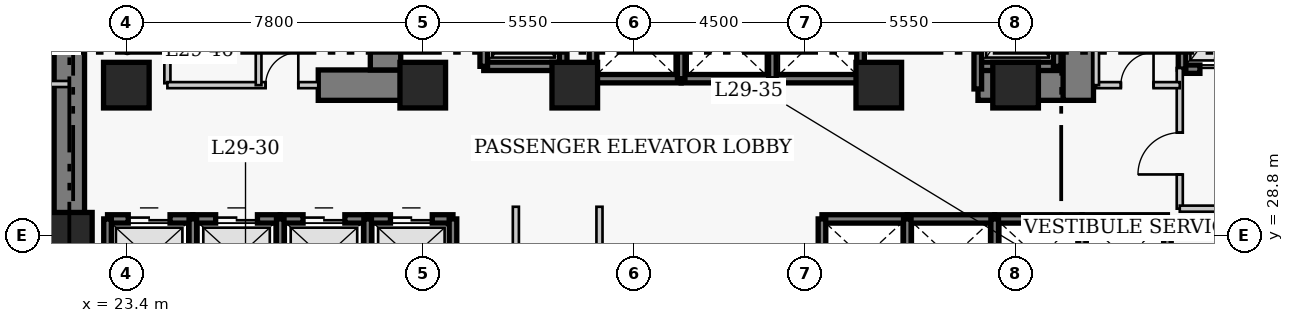
"""IFC4 building model, lengths in metres.
Left out: names, types, materials, properties, quantities, classifications, styles, units other than length and angle.
Written with IfcOpenShell. Run it as: python <this file> out.ifc"""

import sys

from ifc_helpers import new_model, si_unit, direction, frame, frame_2d, origin, origin_2d, place, context, subcontext, project, spatial, rectangle, extrude, element, fill, save


model = new_model("IFC4")
c1 = context("Model", 3, precision=1e-05, world=origin(), true_north=direction((0.0, 1.0)))
c2 = subcontext(c1, "Body", "Model", "MODEL_VIEW")
j1 = project(units=[si_unit("LENGTHUNIT", "METRE"), si_unit("PLANEANGLEUNIT", "RADIAN")], contexts=[c1])
p1 = place(None, origin())
s1 = spatial("IfcSite", under=j1, at=p1, CompositionType="ELEMENT")
p2 = place(p1, origin())
s2 = spatial("IfcBuilding", under=s1, at=p2, CompositionType="ELEMENT")
p3 = place(p2, frame((0.0, 0.0, 118.4)))
s3 = spatial("IfcBuildingStorey", under=s2, at=p3, CompositionType="ELEMENT", Elevation=118.4)
p4 = place(p3, frame((21.9, 27.05, 0.0), z_axis=(0.0, 0.0, 1.0), x_axis=(0.0, 1.0, 0.0)))
e1 = element("IfcWall", 1, at=p4, inside=s3, PredefinedType="SHEAR", context=c2, shape_type="SweptSolid", body=[
    extrude(rectangle(XDim=13.67, YDim=0.8, at=frame_2d((6.835, 0.0))), origin(), (0.0, 0.0, 1.0), 3.8),
])
p5 = place(p3, frame((28.45, 32.75, 0.0), z_axis=(0.0, 0.0, 1.0), x_axis=(1.0, 0.0, 0.0)))
e2 = element("IfcWall", 2, at=p5, inside=s3, PredefinedType="SHEAR", context=c2, shape_type="SweptSolid", body=[
    extrude(rectangle(XDim=2.4, YDim=0.8, at=frame_2d((1.2, 0.0))), origin(), (0.0, 0.0, 1.0), 3.8),
])
p6 = place(p3, frame((45.81, 32.75, 0.0), z_axis=(0.0, 0.0, 1.0), x_axis=(1.0, 0.0, 0.0)))
e3 = element("IfcWall", 3, at=p6, inside=s3, PredefinedType="SHEAR", context=c2, shape_type="SweptSolid", body=[
    extrude(rectangle(XDim=2.64, YDim=0.8, at=frame_2d((1.32, 0.0))), origin(), (0.0, 0.0, 1.0), 3.8),
])
p7 = place(p3, frame((30.22, 33.15, 0.0), z_axis=(0.0, 0.0, 1.0), x_axis=(0.0, 1.0, 0.0)))
e4 = element("IfcWall", 4, at=p7, inside=s3, PredefinedType="SHEAR", context=c2, shape_type="SweptSolid", body=[
    extrude(rectangle(XDim=7.17, YDim=0.8, at=frame_2d((3.585, 0.0))), origin(), (0.0, 0.0, 1.0), 3.8),
])
p8 = place(p3, frame((48.45, 32.35, 0.0), z_axis=(0.0, 0.0, 1.0), x_axis=(0.0, 1.0, 0.0)))
e5 = element("IfcWall", 5, at=p8, inside=s3, PredefinedType="SHEAR", context=c2, shape_type="SweptSolid", body=[
    extrude(rectangle(XDim=7.97, YDim=0.8, at=frame_2d((3.985, 0.0))), origin(), (0.0, 0.0, 1.0), 3.8),
])
p9 = place(p8, frame((5.85, 0.0, 0.0)))
e6 = element("IfcOpeningElement", 6, at=p9, cuts=e5, PredefinedType="OPENING", context=c2, shape_type="SweptSolid", body=[
    extrude(rectangle(XDim=1.1, YDim=2.15, at=frame_2d((0.55, 1.075))), frame((0.0, 0.41, 0.0), z_axis=(0.0, -1.0, 0.0), x_axis=(1.0, 0.0, 0.0)), (0.0, 0.0, 1.0), 0.82),
])
for number, where, z_axis, x_axis in (
    (7, (21.9, 28.8, 0.0), (0.0, 0.0, 1.0), (1.0, 0.0, 0.0)),
    (8, (23.4, 32.75, 0.0), (0.0, 0.0, 1.0), (1.0, 0.0, 0.0)),
    (9, (31.2, 32.75, 0.0), (0.0, 0.0, 1.0), (1.0, 0.0, 0.0)),
    (10, (35.2, 32.75, 0.0), (0.0, 0.0, 1.0), (1.0, 0.0, 0.0)),
    (11, (43.2, 32.75, 0.0), (0.0, 0.0, 1.0), (1.0, 0.0, 0.0)),
    (12, (46.8, 32.75, 0.0), (0.0, 0.0, 1.0), (1.0, 0.0, 0.0)),
):
    element("IfcColumn", number, at=place(p3, frame(where, z_axis=z_axis, x_axis=x_axis)), inside=s3, PredefinedType="COLUMN", context=c2, shape_type="SweptSolid", body=[
        extrude(rectangle(XDim=1.2, YDim=1.2, at=origin_2d()), origin(), (0.0, 0.0, 1.0), 3.8),
    ])
p10 = place(p3, frame((22.905, 29.23, 0.0), z_axis=(0.0, 0.0, 1.0), x_axis=(1.0, 0.0, 0.0)))
e13 = element("IfcWall", 13, at=p10, inside=s3, PredefinedType="SHEAR", context=c2, shape_type="SweptSolid", body=[
    extrude(rectangle(XDim=2.245, YDim=0.22, at=frame_2d((1.123, 0.0))), origin(), (0.0, 0.0, 1.0), 3.8),
])
p11 = place(p10, frame((0.545, 0.0, 0.0)))
e14 = element("IfcOpeningElement", 14, at=p11, cuts=e13, PredefinedType="OPENING", context=c2, shape_type="SweptSolid", body=[
    extrude(rectangle(XDim=1.1, YDim=2.15, at=frame_2d((0.55, 1.075))), frame((0.0, 0.12, 0.0), z_axis=(0.0, -1.0, 0.0), x_axis=(1.0, 0.0, 0.0)), (0.0, 0.0, 1.0), 0.24),
])
p12 = place(p3, frame((22.905, 27.17, 0.0), z_axis=(0.0, 0.0, 1.0), x_axis=(0.0, 1.0, 0.0)))
e15 = element("IfcWall", 15, at=p12, inside=s3, PredefinedType="SHEAR", context=c2, shape_type="SweptSolid", body=[
    extrude(rectangle(XDim=2.06, YDim=0.2, at=frame_2d((1.03, 0.0))), origin(), (0.0, 0.0, 1.0), 3.8),
])
p13 = place(p3, frame((25.15, 29.23, 0.0), z_axis=(0.0, 0.0, 1.0), x_axis=(1.0, 0.0, 0.0)))
e16 = element("IfcWall", 16, at=p13, inside=s3, PredefinedType="SHEAR", context=c2, shape_type="SweptSolid", body=[
    extrude(rectangle(XDim=2.3, YDim=0.22, at=frame_2d((1.15, 0.0))), origin(), (0.0, 0.0, 1.0), 3.8),
])
p14 = place(p13, frame((0.6, 0.0, 0.0)))
e17 = element("IfcOpeningElement", 17, at=p14, cuts=e16, PredefinedType="OPENING", context=c2, shape_type="SweptSolid", body=[
    extrude(rectangle(XDim=1.1, YDim=2.15, at=frame_2d((0.55, 1.075))), frame((0.0, 0.12, 0.0), z_axis=(0.0, -1.0, 0.0), x_axis=(1.0, 0.0, 0.0)), (0.0, 0.0, 1.0), 0.24),
])
p15 = place(p3, frame((25.15, 27.17, 0.0), z_axis=(0.0, 0.0, 1.0), x_axis=(0.0, 1.0, 0.0)))
e18 = element("IfcWall", 18, at=p15, inside=s3, PredefinedType="SHEAR", context=c2, shape_type="SweptSolid", body=[
    extrude(rectangle(XDim=2.06, YDim=0.2, at=frame_2d((1.03, 0.0))), origin(), (0.0, 0.0, 1.0), 3.8),
])
p16 = place(p3, frame((27.45, 29.23, 0.0), z_axis=(0.0, 0.0, 1.0), x_axis=(1.0, 0.0, 0.0)))
e19 = element("IfcWall", 19, at=p16, inside=s3, PredefinedType="SHEAR", context=c2, shape_type="SweptSolid", body=[
    extrude(rectangle(XDim=2.3, YDim=0.22, at=frame_2d((1.15, 0.0))), origin(), (0.0, 0.0, 1.0), 3.8),
])
p17 = place(p16, frame((0.6, 0.0, 0.0)))
e20 = element("IfcOpeningElement", 20, at=p17, cuts=e19, PredefinedType="OPENING", context=c2, shape_type="SweptSolid", body=[
    extrude(rectangle(XDim=1.1, YDim=2.15, at=frame_2d((0.55, 1.075))), frame((0.0, 0.12, 0.0), z_axis=(0.0, -1.0, 0.0), x_axis=(1.0, 0.0, 0.0)), (0.0, 0.0, 1.0), 0.24),
])
p18 = place(p3, frame((27.45, 27.17, 0.0), z_axis=(0.0, 0.0, 1.0), x_axis=(0.0, 1.0, 0.0)))
e21 = element("IfcWall", 21, at=p18, inside=s3, PredefinedType="SHEAR", context=c2, shape_type="SweptSolid", body=[
    extrude(rectangle(XDim=2.06, YDim=0.2, at=frame_2d((1.03, 0.0))), origin(), (0.0, 0.0, 1.0), 3.8),
])
p19 = place(p3, frame((29.75, 29.23, 0.0), z_axis=(0.0, 0.0, 1.0), x_axis=(1.0, 0.0, 0.0)))
e22 = element("IfcWall", 22, at=p19, inside=s3, PredefinedType="SHEAR", context=c2, shape_type="SweptSolid", body=[
    extrude(rectangle(XDim=2.245, YDim=0.22, at=frame_2d((1.123, 0.0))), origin(), (0.0, 0.0, 1.0), 3.8),
])
p20 = place(p19, frame((0.6, 0.0, 0.0)))
e23 = element("IfcOpeningElement", 23, at=p20, cuts=e22, PredefinedType="OPENING", context=c2, shape_type="SweptSolid", body=[
    extrude(rectangle(XDim=1.1, YDim=2.15, at=frame_2d((0.55, 1.075))), frame((0.0, 0.12, 0.0), z_axis=(0.0, -1.0, 0.0), x_axis=(1.0, 0.0, 0.0)), (0.0, 0.0, 1.0), 0.24),
])
for number, where, z_axis, x_axis in (
    (24, (29.75, 27.17, 0.0), (0.0, 0.0, 1.0), (0.0, 1.0, 0.0)),
    (25, (31.995, 27.17, 0.0), (0.0, 0.0, 1.0), (0.0, 1.0, 0.0)),
):
    element("IfcWall", number, at=place(p3, frame(where, z_axis=z_axis, x_axis=x_axis)), inside=s3, PredefinedType="SHEAR", context=c2, shape_type="SweptSolid", body=[
        extrude(rectangle(XDim=2.06, YDim=0.2, at=frame_2d((1.03, 0.0))), origin(), (0.0, 0.0, 1.0), 3.8),
    ])
p21 = place(p3, frame((41.705, 29.23, 0.0), z_axis=(0.0, 0.0, 1.0), x_axis=(1.0, 0.0, 0.0)))
e26 = element("IfcWall", 26, at=p21, inside=s3, PredefinedType="SHEAR", context=c2, shape_type="SweptSolid", body=[
    extrude(rectangle(XDim=2.245, YDim=0.22, at=frame_2d((1.123, 0.0))), origin(), (0.0, 0.0, 1.0), 3.8),
])
p22 = place(p3, frame((41.705, 27.17, 0.0), z_axis=(0.0, 0.0, 1.0), x_axis=(0.0, 1.0, 0.0)))
e27 = element("IfcWall", 27, at=p22, inside=s3, PredefinedType="SHEAR", context=c2, shape_type="SweptSolid", body=[
    extrude(rectangle(XDim=2.06, YDim=0.2, at=frame_2d((1.03, 0.0))), origin(), (0.0, 0.0, 1.0), 3.8),
])
p23 = place(p3, frame((43.95, 29.23, 0.0), z_axis=(0.0, 0.0, 1.0), x_axis=(1.0, 0.0, 0.0)))
e28 = element("IfcWall", 28, at=p23, inside=s3, PredefinedType="SHEAR", context=c2, shape_type="SweptSolid", body=[
    extrude(rectangle(XDim=2.3, YDim=0.22, at=frame_2d((1.15, 0.0))), origin(), (0.0, 0.0, 1.0), 3.8),
])
p24 = place(p3, frame((43.95, 27.17, 0.0), z_axis=(0.0, 0.0, 1.0), x_axis=(0.0, 1.0, 0.0)))
e29 = element("IfcWall", 29, at=p24, inside=s3, PredefinedType="SHEAR", context=c2, shape_type="SweptSolid", body=[
    extrude(rectangle(XDim=2.06, YDim=0.2, at=frame_2d((1.03, 0.0))), origin(), (0.0, 0.0, 1.0), 3.8),
])
p25 = place(p3, frame((46.25, 29.23, 0.0), z_axis=(0.0, 0.0, 1.0), x_axis=(1.0, 0.0, 0.0)))
e30 = element("IfcWall", 30, at=p25, inside=s3, PredefinedType="SHEAR", context=c2, shape_type="SweptSolid", body=[
    extrude(rectangle(XDim=2.3, YDim=0.22, at=frame_2d((1.15, 0.0))), origin(), (0.0, 0.0, 1.0), 3.8),
])
p26 = place(p3, frame((46.25, 27.17, 0.0), z_axis=(0.0, 0.0, 1.0), x_axis=(0.0, 1.0, 0.0)))
e31 = element("IfcWall", 31, at=p26, inside=s3, PredefinedType="SHEAR", context=c2, shape_type="SweptSolid", body=[
    extrude(rectangle(XDim=2.06, YDim=0.2, at=frame_2d((1.03, 0.0))), origin(), (0.0, 0.0, 1.0), 3.8),
])
p27 = place(p3, frame((48.55, 29.23, 0.0), z_axis=(0.0, 0.0, 1.0), x_axis=(1.0, 0.0, 0.0)))
e32 = element("IfcWall", 32, at=p27, inside=s3, PredefinedType="SHEAR", context=c2, shape_type="SweptSolid", body=[
    extrude(rectangle(XDim=2.245, YDim=0.22, at=frame_2d((1.123, 0.0))), origin(), (0.0, 0.0, 1.0), 3.8),
])
for number, where, z_axis, x_axis in (
    (33, (48.55, 27.17, 0.0), (0.0, 0.0, 1.0), (0.0, 1.0, 0.0)),
    (34, (50.795, 27.17, 0.0), (0.0, 0.0, 1.0), (0.0, 1.0, 0.0)),
):
    element("IfcWall", number, at=place(p3, frame(where, z_axis=z_axis, x_axis=x_axis)), inside=s3, PredefinedType="SHEAR", context=c2, shape_type="SweptSolid", body=[
        extrude(rectangle(XDim=2.06, YDim=0.2, at=frame_2d((1.03, 0.0))), origin(), (0.0, 0.0, 1.0), 3.8),
    ])
p28 = place(p3, frame((35.68, 32.92, 0.0), z_axis=(0.0, 0.0, 1.0), x_axis=(1.0, 0.0, 0.0)))
e35 = element("IfcWall", 35, at=p28, inside=s3, PredefinedType="SHEAR", context=c2, shape_type="SweptSolid", body=[
    extrude(rectangle(XDim=2.32, YDim=0.22, at=frame_2d((1.16, 0.0))), origin(), (0.0, 0.0, 1.0), 3.8),
])
p29 = place(p3, frame((35.68, 32.92, 0.0), z_axis=(0.0, 0.0, 1.0), x_axis=(0.0, 1.0, 0.0)))
e36 = element("IfcWall", 36, at=p29, inside=s3, PredefinedType="SHEAR", context=c2, shape_type="SweptSolid", body=[
    extrude(rectangle(XDim=2.16, YDim=0.2, at=frame_2d((1.08, 0.0))), origin(), (0.0, 0.0, 1.0), 3.8),
])
p30 = place(p3, frame((38.0, 32.92, 0.0), z_axis=(0.0, 0.0, 1.0), x_axis=(1.0, 0.0, 0.0)))
e37 = element("IfcWall", 37, at=p30, inside=s3, PredefinedType="SHEAR", context=c2, shape_type="SweptSolid", body=[
    extrude(rectangle(XDim=2.4, YDim=0.22, at=frame_2d((1.2, 0.0))), origin(), (0.0, 0.0, 1.0), 3.8),
])
p31 = place(p3, frame((38.0, 32.92, 0.0), z_axis=(0.0, 0.0, 1.0), x_axis=(0.0, 1.0, 0.0)))
e38 = element("IfcWall", 38, at=p31, inside=s3, PredefinedType="SHEAR", context=c2, shape_type="SweptSolid", body=[
    extrude(rectangle(XDim=2.16, YDim=0.2, at=frame_2d((1.08, 0.0))), origin(), (0.0, 0.0, 1.0), 3.8),
])
p32 = place(p3, frame((40.4, 32.92, 0.0), z_axis=(0.0, 0.0, 1.0), x_axis=(1.0, 0.0, 0.0)))
e39 = element("IfcWall", 39, at=p32, inside=s3, PredefinedType="SHEAR", context=c2, shape_type="SweptSolid", body=[
    extrude(rectangle(XDim=2.32, YDim=0.22, at=frame_2d((1.16, 0.0))), origin(), (0.0, 0.0, 1.0), 3.8),
])
for number, where, z_axis, x_axis in (
    (40, (40.4, 32.92, 0.0), (0.0, 0.0, 1.0), (0.0, 1.0, 0.0)),
    (41, (42.72, 32.92, 0.0), (0.0, 0.0, 1.0), (0.0, 1.0, 0.0)),
):
    element("IfcWall", number, at=place(p3, frame(where, z_axis=z_axis, x_axis=x_axis)), inside=s3, PredefinedType="SHEAR", context=c2, shape_type="SweptSolid", body=[
        extrude(rectangle(XDim=2.16, YDim=0.2, at=frame_2d((1.08, 0.0))), origin(), (0.0, 0.0, 1.0), 3.8),
    ])
p33 = place(p3, frame((51.18, 33.17, 0.0), z_axis=(0.0, 0.0, 1.0), x_axis=(1.0, 0.0, 0.0)))
e42 = element("IfcWall", 42, at=p33, inside=s3, PredefinedType="SHEAR", context=c2, shape_type="SweptSolid", body=[
    extrude(rectangle(XDim=2.42, YDim=0.22, at=frame_2d((1.21, 0.0))), origin(), (0.0, 0.0, 1.0), 3.8),
])
p34 = place(p33, frame((0.47, 0.0, 0.0)))
e43 = element("IfcOpeningElement", 43, at=p34, cuts=e42, PredefinedType="OPENING", context=c2, shape_type="SweptSolid", body=[
    extrude(rectangle(XDim=1.3, YDim=2.15, at=frame_2d((0.65, 1.075))), frame((0.0, 0.12, 0.0), z_axis=(0.0, -1.0, 0.0), x_axis=(1.0, 0.0, 0.0)), (0.0, 0.0, 1.0), 0.24),
])
p35 = place(p3, frame((51.18, 33.17, 0.0), z_axis=(0.0, 0.0, 1.0), x_axis=(0.0, 1.0, 0.0)))
e44 = element("IfcWall", 44, at=p35, inside=s3, PredefinedType="SHEAR", context=c2, shape_type="SweptSolid", body=[
    extrude(rectangle(XDim=2.86, YDim=0.2, at=frame_2d((1.43, 0.0))), origin(), (0.0, 0.0, 1.0), 3.8),
])
p36 = place(p3, frame((32.805, 33.245, 0.0), z_axis=(0.0, 0.0, 1.0), x_axis=(1.0, 0.0, 0.0)))
e45 = element("IfcWall", 45, at=p36, inside=s3, PredefinedType="SHEAR", context=c2, shape_type="SweptSolid", body=[
    extrude(rectangle(XDim=2.09, YDim=0.22, at=frame_2d((1.045, 0.0))), origin(), (0.0, 0.0, 1.0), 3.8),
])
for number, where, z_axis, x_axis in (
    (46, (32.805, 33.245, 0.0), (0.0, 0.0, 1.0), (0.0, 1.0, 0.0)),
    (47, (34.895, 33.245, 0.0), (0.0, 0.0, 1.0), (0.0, 1.0, 0.0)),
):
    element("IfcWall", number, at=place(p3, frame(where, z_axis=z_axis, x_axis=x_axis)), inside=s3, PredefinedType="SHEAR", context=c2, shape_type="SweptSolid", body=[
        extrude(rectangle(XDim=2.91, YDim=0.2, at=frame_2d((1.455, 0.0))), origin(), (0.0, 0.0, 1.0), 3.8),
    ])
p37 = place(p3, frame((45.805, 33.245, 0.0), z_axis=(0.0, 0.0, 1.0), x_axis=(1.0, 0.0, 0.0)))
e48 = element("IfcWall", 48, at=p37, inside=s3, PredefinedType="SHEAR", context=c2, shape_type="SweptSolid", body=[
    extrude(rectangle(XDim=2.09, YDim=0.22, at=frame_2d((1.045, 0.0))), origin(), (0.0, 0.0, 1.0), 3.8),
])
p38 = place(p3, frame((45.805, 32.65, 0.0), z_axis=(0.0, 0.0, 1.0), x_axis=(0.0, 1.0, 0.0)))
e49 = element("IfcWall", 49, at=p38, inside=s3, PredefinedType="SHEAR", context=c2, shape_type="SweptSolid", body=[
    extrude(rectangle(XDim=3.505, YDim=0.2, at=frame_2d((1.752, 0.0))), origin(), (0.0, 0.0, 1.0), 3.8),
])
p39 = place(p3, frame((47.895, 33.245, 0.0), z_axis=(0.0, 0.0, 1.0), x_axis=(0.0, 1.0, 0.0)))
e50 = element("IfcWall", 50, at=p39, inside=s3, PredefinedType="SHEAR", context=c2, shape_type="SweptSolid", body=[
    extrude(rectangle(XDim=2.91, YDim=0.2, at=frame_2d((1.455, 0.0))), origin(), (0.0, 0.0, 1.0), 3.8),
])
p40 = place(p3, frame((24.48, 32.8, 0.0), z_axis=(0.0, 0.0, 1.0), x_axis=(0.0, 1.0, 0.0)))
e51 = element("IfcWall", 51, at=p40, inside=s3, PredefinedType="PARTITIONING", context=c2, shape_type="SweptSolid", body=[
    extrude(rectangle(XDim=3.57, YDim=0.16, at=frame_2d((1.785, 0.0))), origin(), (0.0, 0.0, 1.0), 3.54),
])
p41 = place(p40, frame((1.604, 0.0, 0.0)))
e52 = element("IfcOpeningElement", 52, at=p41, cuts=e51, PredefinedType="OPENING", context=c2, shape_type="SweptSolid", body=[
    extrude(rectangle(XDim=0.9, YDim=2.1, at=frame_2d((0.45, 1.05))), frame((0.0, 0.09, 0.0), z_axis=(0.0, -1.0, 0.0), x_axis=(1.0, 0.0, 0.0)), (0.0, 0.0, 1.0), 0.18),
])
p42 = place(p3, frame((51.12, 29.5, 0.0), z_axis=(0.0, 0.0, 1.0), x_axis=(0.0, 1.0, 0.0)))
e53 = element("IfcWall", 53, at=p42, inside=s3, PredefinedType="PARTITIONING", context=c2, shape_type="SweptSolid", body=[
    extrude(rectangle(XDim=3.7, YDim=0.16, at=frame_2d((1.85, 0.0))), origin(), (0.0, 0.0, 1.0), 3.54),
])
p43 = place(p42, frame((0.9, 0.0, 0.0)))
e54 = element("IfcOpeningElement", 54, at=p43, cuts=e53, PredefinedType="OPENING", context=c2, shape_type="SweptSolid", body=[
    extrude(rectangle(XDim=1.1, YDim=2.15, at=frame_2d((0.55, 1.075))), frame((0.0, 0.09, 0.0), z_axis=(0.0, -1.0, 0.0), x_axis=(1.0, 0.0, 0.0)), (0.0, 0.0, 1.0), 0.18),
])
p44 = place(p3, frame((51.12, 29.5, 0.0), z_axis=(0.0, 0.0, 1.0), x_axis=(1.0, 0.0, 0.0)))
e55 = element("IfcWall", 55, at=p44, inside=s3, PredefinedType="PARTITIONING", context=c2, shape_type="SweptSolid", body=[
    extrude(rectangle(XDim=5.63, YDim=0.16, at=frame_2d((2.815, 0.0))), origin(), (0.0, 0.0, 1.0), 3.54),
])
p45 = place(p3, frame((24.48, 32.75, 0.0), z_axis=(0.0, 0.0, 1.0), x_axis=(1.0, 0.0, 0.0)))
e56 = element("IfcWall", 56, at=p45, inside=s3, PredefinedType="PARTITIONING", context=c2, shape_type="SweptSolid", body=[
    extrude(rectangle(XDim=3.97, YDim=0.16, at=frame_2d((1.985, 0.0))), origin(), (0.0, 0.0, 1.0), 3.54),
])
p46 = place(p45, frame((2.585, 0.0, 0.0)))
e57 = element("IfcOpeningElement", 57, at=p46, cuts=e56, PredefinedType="OPENING", context=c2, shape_type="SweptSolid", body=[
    extrude(rectangle(XDim=0.86, YDim=2.05, at=frame_2d((0.43, 1.025))), frame((0.0, 0.09, 0.0), z_axis=(0.0, -1.0, 0.0), x_axis=(1.0, 0.0, 0.0)), (0.0, 0.0, 1.0), 0.18),
])
p47 = place(p3, frame((48.92, 32.75, 0.0), z_axis=(0.0, 0.0, 1.0), x_axis=(1.0, 0.0, 0.0)))
e58 = element("IfcWall", 58, at=p47, inside=s3, PredefinedType="PARTITIONING", context=c2, shape_type="SweptSolid", body=[
    extrude(rectangle(XDim=2.2, YDim=0.16, at=frame_2d((1.1, 0.0))), origin(), (0.0, 0.0, 1.0), 3.54),
])
p48 = place(p47, frame((0.65, 0.0, 0.0)))
e59 = element("IfcOpeningElement", 59, at=p48, cuts=e58, PredefinedType="OPENING", context=c2, shape_type="SweptSolid", body=[
    extrude(rectangle(XDim=0.86, YDim=2.05, at=frame_2d((0.43, 1.025))), frame((0.0, 0.09, 0.0), z_axis=(0.0, -1.0, 0.0), x_axis=(1.0, 0.0, 0.0)), (0.0, 0.0, 1.0), 0.18),
])
for number, where, z_axis, x_axis in (
    (60, (48.92, 32.75, 0.0), (0.0, 0.0, 1.0), (0.0, 1.0, 0.0)),
    (61, (26.88, 32.75, 0.0), (0.0, 0.0, 1.0), (0.0, 1.0, 0.0)),
):
    element("IfcWall", number, at=place(p3, frame(where, z_axis=z_axis, x_axis=x_axis)), inside=s3, PredefinedType="PARTITIONING", context=c2, shape_type="SweptSolid", body=[
        extrude(rectangle(XDim=3.62, YDim=0.15, at=frame_2d((1.81, 0.0))), origin(), (0.0, 0.0, 1.0), 3.54),
    ])
for number, where, z_axis, x_axis in (
    (62, (33.65, 26.36, 0.0), (0.0, 0.0, 1.0), (0.0, 1.0, 0.0)),
    (63, (35.85, 26.36, 0.0), (0.0, 0.0, 1.0), (0.0, 1.0, 0.0)),
):
    element("IfcWall", number, at=place(p3, frame(where, z_axis=z_axis, x_axis=x_axis)), inside=s3, PredefinedType="PARTITIONING", context=c2, shape_type="SweptSolid", body=[
        extrude(rectangle(XDim=3.19, YDim=0.16, at=frame_2d((1.595, 0.0))), origin(), (0.0, 0.0, 1.0), 3.54),
    ])
p49 = place(p3, frame((19.96, 32.78, 0.0), z_axis=(0.0, 0.0, 1.0), x_axis=(1.0, 0.0, 0.0)))
e64 = element("IfcWall", 64, at=p49, inside=s3, PredefinedType="PARTITIONING", context=c2, shape_type="SweptSolid", body=[
    extrude(rectangle(XDim=1.94, YDim=0.16, at=frame_2d((0.97, 0.0))), origin(), (0.0, 0.0, 1.0), 3.54),
])
p50 = place(p11, origin())
e65 = element("IfcDoor", 65, at=p50, inside=s3, OperationType="DOUBLE_DOOR_SLIDING", PredefinedType="DOOR", context=c2, shape_type="SweptSolid", body=[
    extrude(rectangle(XDim=1.1, YDim=2.15, at=frame_2d((0.55, 1.075))), frame((0.0, 0.025, 0.0), z_axis=(0.0, -1.0, 0.0), x_axis=(1.0, 0.0, 0.0)), (0.0, 0.0, 1.0), 0.05),
])
fill(e14, e65)
p51 = place(p14, origin())
e66 = element("IfcDoor", 66, at=p51, inside=s3, OperationType="DOUBLE_DOOR_SLIDING", PredefinedType="DOOR", context=c2, shape_type="SweptSolid", body=[
    extrude(rectangle(XDim=1.1, YDim=2.15, at=frame_2d((0.55, 1.075))), frame((0.0, 0.025, 0.0), z_axis=(0.0, -1.0, 0.0), x_axis=(1.0, 0.0, 0.0)), (0.0, 0.0, 1.0), 0.05),
])
fill(e17, e66)
p52 = place(p17, origin())
e67 = element("IfcDoor", 67, at=p52, inside=s3, OperationType="DOUBLE_DOOR_SLIDING", PredefinedType="DOOR", context=c2, shape_type="SweptSolid", body=[
    extrude(rectangle(XDim=1.1, YDim=2.15, at=frame_2d((0.55, 1.075))), frame((0.0, 0.025, 0.0), z_axis=(0.0, -1.0, 0.0), x_axis=(1.0, 0.0, 0.0)), (0.0, 0.0, 1.0), 0.05),
])
fill(e20, e67)
p53 = place(p20, origin())
e68 = element("IfcDoor", 68, at=p53, inside=s3, OperationType="DOUBLE_DOOR_SLIDING", PredefinedType="DOOR", context=c2, shape_type="SweptSolid", body=[
    extrude(rectangle(XDim=1.1, YDim=2.15, at=frame_2d((0.55, 1.075))), frame((0.0, 0.025, 0.0), z_axis=(0.0, -1.0, 0.0), x_axis=(1.0, 0.0, 0.0)), (0.0, 0.0, 1.0), 0.05),
])
fill(e23, e68)
p54 = place(p34, origin())
e69 = element("IfcDoor", 69, at=p54, inside=s3, OperationType="DOUBLE_DOOR_SLIDING", PredefinedType="DOOR", context=c2, shape_type="SweptSolid", body=[
    extrude(rectangle(XDim=1.3, YDim=2.15, at=frame_2d((0.65, 1.075))), frame((0.0, 0.025, 0.0), z_axis=(0.0, -1.0, 0.0), x_axis=(1.0, 0.0, 0.0)), (0.0, 0.0, 1.0), 0.05),
])
fill(e43, e69)
p55 = place(p43, origin())
e70 = element("IfcDoor", 70, at=p55, inside=s3, OperationType="SINGLE_SWING_LEFT", PredefinedType="DOOR", context=c2, shape_type="SweptSolid", body=[
    extrude(rectangle(XDim=1.1, YDim=2.15, at=frame_2d((0.55, 1.075))), frame((0.0, 0.025, 0.0), z_axis=(0.0, -1.0, 0.0), x_axis=(1.0, 0.0, 0.0)), (0.0, 0.0, 1.0), 0.05),
])
fill(e54, e70)
p56 = place(p46, origin())
e71 = element("IfcDoor", 71, at=p56, inside=s3, OperationType="SINGLE_SWING_RIGHT", PredefinedType="DOOR", context=c2, shape_type="SweptSolid", body=[
    extrude(rectangle(XDim=0.86, YDim=2.05, at=frame_2d((0.43, 1.025))), frame((0.0, 0.025, 0.0), z_axis=(0.0, -1.0, 0.0), x_axis=(1.0, 0.0, 0.0)), (0.0, 0.0, 1.0), 0.05),
])
fill(e57, e71)
p57 = place(p48, origin())
e72 = element("IfcDoor", 72, at=p57, inside=s3, OperationType="SINGLE_SWING_RIGHT", PredefinedType="DOOR", context=c2, shape_type="SweptSolid", body=[
    extrude(rectangle(XDim=0.86, YDim=2.05, at=frame_2d((0.43, 1.025))), frame((0.0, 0.025, 0.0), z_axis=(0.0, -1.0, 0.0), x_axis=(1.0, 0.0, 0.0)), (0.0, 0.0, 1.0), 0.05),
])
fill(e59, e72)
save(model, sys.argv[1])
